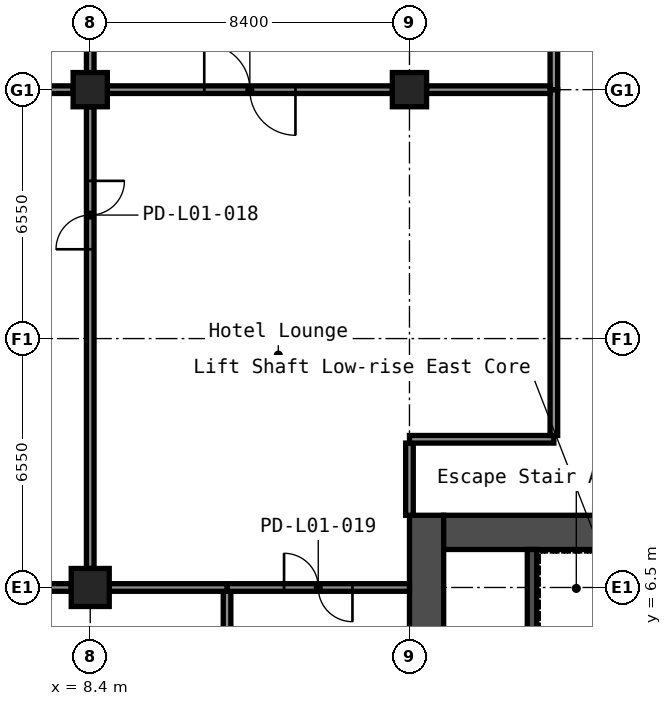
"""IFC4 building model, lengths in metres.
Left out: names, types, materials, properties, quantities, classifications, styles, units other than length and angle.
Written with IfcOpenShell. Run it as: python <this file> out.ifc"""

import sys

from ifc_helpers import new_model, si_unit, direction, frame, frame_2d, origin, origin_2d, place, context, subcontext, project, spatial, rectangle, hollow_rectangle, extrude, element, fill, save


model = new_model("IFC4")
c1 = context("Model", 3, precision=1e-05, world=origin(), true_north=direction((0.0, 1.0)))
c2 = subcontext(c1, "Body", "Model", "MODEL_VIEW")
j1 = project(units=[si_unit("LENGTHUNIT", "METRE"), si_unit("PLANEANGLEUNIT", "RADIAN")], contexts=[c1])
p1 = place(None, origin())
s1 = spatial("IfcSite", under=j1, at=p1, CompositionType="ELEMENT")
p2 = place(p1, origin())
s2 = spatial("IfcBuilding", under=s1, at=p2, CompositionType="ELEMENT")
p3 = place(p2, origin())
s3 = spatial("IfcBuildingStorey", under=s2, at=p3, CompositionType="ELEMENT", Elevation=0.0)
p4 = place(p3, frame((8.4, 6.5, -0.3), z_axis=(0.0, 0.0, 1.0), x_axis=(1.0, 0.0, 0.0)))
e1 = element("IfcColumn", 1, at=p4, inside=s3, PredefinedType="COLUMN", context=c2, shape_type="SweptSolid", body=[
    extrude(hollow_rectangle(XDim=1.0, YDim=1.0, WallThickness=0.04, at=origin_2d()), origin(), (0.0, 0.0, 1.0), 8.9),
])
for number, where, z_axis, x_axis in (
    (2, (8.4, 19.6, -0.3), (0.0, 0.0, 1.0), (1.0, 0.0, 0.0)),
    (3, (16.8, 19.6, -0.3), (0.0, 0.0, 1.0), (1.0, 0.0, 0.0)),
):
    element("IfcColumn", number, at=place(p3, frame(where, z_axis=z_axis, x_axis=x_axis)), inside=s3, PredefinedType="COLUMN", context=c2, shape_type="SweptSolid", body=[
        extrude(hollow_rectangle(XDim=0.9, YDim=0.9, WallThickness=0.036, at=origin_2d()), origin(), (0.0, 0.0, 1.0), 8.9),
    ])
p5 = place(p3, frame((17.25, -8.4, 0.0), z_axis=(0.0, 0.0, 1.0), x_axis=(0.0, 1.0, 0.0)))
e4 = element("IfcWall", 4, at=p5, inside=s3, PredefinedType="SHEAR", context=c2, shape_type="SweptSolid", body=[
    extrude(rectangle(XDim=16.8, YDim=0.9, at=frame_2d((8.4, 0.0))), origin(), (0.0, 0.0, 1.0), 8.6),
])
p6 = place(p5, frame((3.4, 0.0, 0.0)))
e5 = element("IfcOpeningElement", 5, at=p6, cuts=e4, PredefinedType="OPENING", context=c2, shape_type="SweptSolid", body=[
    extrude(rectangle(XDim=1.6, YDim=2.1, at=frame_2d((0.8, 1.05))), frame((0.0, 0.46, 0.0), z_axis=(0.0, -1.0, 0.0), x_axis=(1.0, 0.0, 0.0)), (0.0, 0.0, 1.0), 0.92),
])
p7 = place(p5, frame((9.6, 0.0, 0.0)))
e6 = element("IfcOpeningElement", 6, at=p7, cuts=e4, PredefinedType="OPENING", context=c2, shape_type="SweptSolid", body=[
    extrude(rectangle(XDim=1.6, YDim=2.1, at=frame_2d((0.8, 1.05))), frame((0.0, 0.46, 0.0), z_axis=(0.0, -1.0, 0.0), x_axis=(1.0, 0.0, 0.0)), (0.0, 0.0, 1.0), 0.92),
])
p8 = place(p5, frame((11.8, 0.0, 0.0)))
e7 = element("IfcOpeningElement", 7, at=p8, cuts=e4, PredefinedType="OPENING", context=c2, shape_type="SweptSolid", body=[
    extrude(rectangle(XDim=1.6, YDim=2.1, at=frame_2d((0.8, 1.05))), frame((0.0, 0.46, 0.0), z_axis=(0.0, -1.0, 0.0), x_axis=(1.0, 0.0, 0.0)), (0.0, 0.0, 1.0), 0.92),
])
p9 = place(p3, frame((17.7, 7.95, 0.0), z_axis=(0.0, 0.0, 1.0), x_axis=(1.0, 0.0, 0.0)))
e8 = element("IfcWall", 8, at=p9, inside=s3, PredefinedType="SHEAR", context=c2, shape_type="SweptSolid", body=[
    extrude(rectangle(XDim=15.0, YDim=0.9, at=frame_2d((7.5, 0.0))), origin(), (0.0, 0.0, 1.0), 8.6),
])
p10 = place(p9, frame((10.4, 0.0, 0.0)))
e9 = element("IfcOpeningElement", 9, at=p10, cuts=e8, PredefinedType="OPENING", context=c2, shape_type="SweptSolid", body=[
    extrude(rectangle(XDim=1.2, YDim=2.1, at=frame_2d((0.6, 1.05))), frame((0.0, 0.46, 0.0), z_axis=(0.0, -1.0, 0.0), x_axis=(1.0, 0.0, 0.0)), (0.0, 0.0, 1.0), 0.92),
])
p11 = place(p9, frame((13.35, 0.0, 0.0)))
e10 = element("IfcOpeningElement", 10, at=p11, cuts=e8, PredefinedType="OPENING", context=c2, shape_type="SweptSolid", body=[
    extrude(rectangle(XDim=0.9, YDim=2.1, at=frame_2d((0.45, 1.05))), frame((0.0, 0.46, 0.0), z_axis=(0.0, -1.0, 0.0), x_axis=(1.0, 0.0, 0.0)), (0.0, 0.0, 1.0), 0.92),
])
p12 = place(p9, frame((6.75, 0.0, 0.0)))
e11 = element("IfcOpeningElement", 11, at=p12, cuts=e8, PredefinedType="OPENING", context=c2, shape_type="SweptSolid", body=[
    extrude(rectangle(XDim=1.2, YDim=2.1, at=frame_2d((0.6, 1.05))), frame((0.0, 0.46, 0.0), z_axis=(0.0, -1.0, 0.0), x_axis=(1.0, 0.0, 0.0)), (0.0, 0.0, 1.0), 0.92),
])
p13 = place(p3, frame((20.025, 1.2, 0.0), z_axis=(0.0, 0.0, 1.0), x_axis=(0.0, 1.0, 0.0)))
e12 = element("IfcWall", 12, at=p13, inside=s3, PredefinedType="SHEAR", context=c2, shape_type="SweptSolid", body=[
    extrude(rectangle(XDim=6.3, YDim=0.25, at=frame_2d((3.15, 0.0))), origin(), (0.0, 0.0, 1.0), 8.6),
])
p14 = place(p3, frame((8.4, 24.15, 0.0), z_axis=(0.0, 0.0, 1.0), x_axis=(0.0, -1.0, 0.0)))
e13 = element("IfcWall", 13, at=p14, inside=s3, PredefinedType="PARTITIONING", context=c2, shape_type="SweptSolid", body=[
    extrude(rectangle(XDim=4.1, YDim=0.2, at=frame_2d((2.05, 0.0))), origin(), (0.0, 0.0, 1.0), 8.6),
])
p15 = place(p3, frame((16.8, 8.4, 0.0), z_axis=(0.0, 0.0, 1.0), x_axis=(0.0, 1.0, 0.0)))
e14 = element("IfcWall", 14, at=p15, inside=s3, PredefinedType="PARTITIONING", context=c2, shape_type="SweptSolid", body=[
    extrude(rectangle(XDim=1.9, YDim=0.2, at=frame_2d((0.95, 0.0))), origin(), (0.0, 0.0, 1.0), 8.6),
])
p16 = place(p3, frame((16.8, 10.4, 0.0), z_axis=(0.0, 0.0, 1.0), x_axis=(1.0, 0.0, 0.0)))
e15 = element("IfcWall", 15, at=p16, inside=s3, PredefinedType="PARTITIONING", context=c2, shape_type="SweptSolid", body=[
    extrude(rectangle(XDim=3.8, YDim=0.2, at=frame_2d((1.9, 0.0))), origin(), (0.0, 0.0, 1.0), 8.6),
])
p17 = place(p3, frame((20.6, 10.5, 0.0), z_axis=(0.0, 0.0, 1.0), x_axis=(0.0, 1.0, 0.0)))
e16 = element("IfcWall", 16, at=p17, inside=s3, PredefinedType="PARTITIONING", context=c2, shape_type="SweptSolid", body=[
    extrude(rectangle(XDim=9.1, YDim=0.2, at=frame_2d((4.55, 0.0))), origin(), (0.0, 0.0, 1.0), 8.6),
])
p18 = place(p3, frame((20.6, 19.6, 0.0), z_axis=(0.0, 0.0, 1.0), x_axis=(0.0, 1.0, 0.0)))
e17 = element("IfcWall", 17, at=p18, inside=s3, PredefinedType="PARTITIONING", context=c2, shape_type="SweptSolid", body=[
    extrude(rectangle(XDim=5.25, YDim=0.2, at=frame_2d((2.625, 0.0))), origin(), (0.0, 0.0, 1.0), 8.6),
])
p19 = place(p18, frame((1.8, 0.0, 0.0)))
e18 = element("IfcOpeningElement", 18, at=p19, cuts=e17, PredefinedType="OPENING", context=c2, shape_type="SweptSolid", body=[
    extrude(rectangle(XDim=1.2, YDim=2.1, at=frame_2d((0.6, 1.05))), frame((0.0, 0.11, 0.0), z_axis=(0.0, -1.0, 0.0), x_axis=(1.0, 0.0, 0.0)), (0.0, 0.0, 1.0), 0.22),
])
p20 = place(p3, frame((12.0, -6.4, 0.0), z_axis=(0.0, 0.0, 1.0), x_axis=(0.0, 1.0, 0.0)))
e19 = element("IfcWall", 19, at=p20, inside=s3, PredefinedType="PARTITIONING", context=c2, shape_type="SweptSolid", body=[
    extrude(rectangle(XDim=12.8, YDim=0.2, at=frame_2d((6.4, 0.0))), origin(), (0.0, 0.0, 1.0), 8.6),
])
p21 = place(p20, frame((5.2, 0.0, 0.0)))
e20 = element("IfcOpeningElement", 20, at=p21, cuts=e19, PredefinedType="OPENING", context=c2, shape_type="SweptSolid", body=[
    extrude(rectangle(XDim=2.4, YDim=2.1, at=frame_2d((1.2, 1.05))), frame((0.0, 0.11, 0.0), z_axis=(0.0, -1.0, 0.0), x_axis=(1.0, 0.0, 0.0)), (0.0, 0.0, 1.0), 0.22),
])
p22 = place(p3, frame((12.0, 6.5, 0.0), z_axis=(0.0, 0.0, 1.0), x_axis=(1.0, 0.0, 0.0)))
e21 = element("IfcWall", 21, at=p22, inside=s3, PredefinedType="PARTITIONING", context=c2, shape_type="SweptSolid", body=[
    extrude(rectangle(XDim=4.8, YDim=0.2, at=frame_2d((2.4, 0.0))), origin(), (0.0, 0.0, 1.0), 8.6),
])
p23 = place(p22, frame((1.5, 0.0, 0.0)))
e22 = element("IfcOpeningElement", 22, at=p23, cuts=e21, PredefinedType="OPENING", context=c2, shape_type="SweptSolid", body=[
    extrude(rectangle(XDim=1.8, YDim=2.1, at=frame_2d((0.9, 1.05))), frame((0.0, 0.11, 0.0), z_axis=(0.0, -1.0, 0.0), x_axis=(1.0, 0.0, 0.0)), (0.0, 0.0, 1.0), 0.22),
])
p24 = place(p3, frame((8.9, 6.5, 0.0), z_axis=(0.0, 0.0, 1.0), x_axis=(1.0, 0.0, 0.0)))
e23 = element("IfcWall", 23, at=p24, inside=s3, PredefinedType="PARTITIONING", context=c2, shape_type="SweptSolid", body=[
    extrude(rectangle(XDim=3.1, YDim=0.2, at=frame_2d((1.55, 0.0))), origin(), (0.0, 0.0, 1.0), 8.6),
])
p25 = place(p3, frame((0.5, 6.5, 0.0), z_axis=(0.0, 0.0, 1.0), x_axis=(1.0, 0.0, 0.0)))
e24 = element("IfcWall", 24, at=p25, inside=s3, PredefinedType="PARTITIONING", context=c2, shape_type="SweptSolid", body=[
    extrude(rectangle(XDim=7.4, YDim=0.2, at=frame_2d((3.7, 0.0))), origin(), (0.0, 0.0, 1.0), 8.6),
])
p26 = place(p25, frame((2.5, 0.0, 0.0)))
e25 = element("IfcOpeningElement", 25, at=p26, cuts=e24, PredefinedType="OPENING", context=c2, shape_type="SweptSolid", body=[
    extrude(rectangle(XDim=2.4, YDim=2.1, at=frame_2d((1.2, 1.05))), frame((0.0, 0.11, 0.0), z_axis=(0.0, -1.0, 0.0), x_axis=(1.0, 0.0, 0.0)), (0.0, 0.0, 1.0), 0.22),
])
p27 = place(p3, frame((8.85, 19.6, 0.0), z_axis=(0.0, 0.0, 1.0), x_axis=(1.0, 0.0, 0.0)))
e26 = element("IfcWall", 26, at=p27, inside=s3, PredefinedType="PARTITIONING", context=c2, shape_type="SweptSolid", body=[
    extrude(rectangle(XDim=7.5, YDim=0.2, at=frame_2d((3.75, 0.0))), origin(), (0.0, 0.0, 1.0), 8.6),
])
p28 = place(p27, frame((2.55, 0.0, 0.0)))
e27 = element("IfcOpeningElement", 27, at=p28, cuts=e26, PredefinedType="OPENING", context=c2, shape_type="SweptSolid", body=[
    extrude(rectangle(XDim=2.4, YDim=2.1, at=frame_2d((1.2, 1.05))), frame((0.0, 0.11, 0.0), z_axis=(0.0, -1.0, 0.0), x_axis=(1.0, 0.0, 0.0)), (0.0, 0.0, 1.0), 0.22),
])
p29 = place(p3, frame((17.25, 19.6, 0.0), z_axis=(0.0, 0.0, 1.0), x_axis=(1.0, 0.0, 0.0)))
e28 = element("IfcWall", 28, at=p29, inside=s3, PredefinedType="PARTITIONING", context=c2, shape_type="SweptSolid", body=[
    extrude(rectangle(XDim=3.25, YDim=0.2, at=frame_2d((1.625, 0.0))), origin(), (0.0, 0.0, 1.0), 8.6),
])
p30 = place(p3, frame((0.45, 19.6, 0.0), z_axis=(0.0, 0.0, 1.0), x_axis=(1.0, 0.0, 0.0)))
e29 = element("IfcWall", 29, at=p30, inside=s3, PredefinedType="PARTITIONING", context=c2, shape_type="SweptSolid", body=[
    extrude(rectangle(XDim=7.5, YDim=0.2, at=frame_2d((3.75, 0.0))), origin(), (0.0, 0.0, 1.0), 8.6),
])
p31 = place(p30, frame((2.55, 0.0, 0.0)))
e30 = element("IfcOpeningElement", 30, at=p31, cuts=e29, PredefinedType="OPENING", context=c2, shape_type="SweptSolid", body=[
    extrude(rectangle(XDim=2.4, YDim=2.1, at=frame_2d((1.2, 1.05))), frame((0.0, 0.11, 0.0), z_axis=(0.0, -1.0, 0.0), x_axis=(1.0, 0.0, 0.0)), (0.0, 0.0, 1.0), 0.22),
])
p32 = place(p3, frame((8.4, 19.15, 0.0), z_axis=(0.0, 0.0, 1.0), x_axis=(0.0, -1.0, 0.0)))
e31 = element("IfcWall", 31, at=p32, inside=s3, PredefinedType="PARTITIONING", context=c2, shape_type="SweptSolid", body=[
    extrude(rectangle(XDim=12.15, YDim=0.2, at=frame_2d((6.075, 0.0))), origin(), (0.0, 0.0, 1.0), 8.6),
])
p33 = place(p32, frame((1.95, 0.0, 0.0)))
e32 = element("IfcOpeningElement", 32, at=p33, cuts=e31, PredefinedType="OPENING", context=c2, shape_type="SweptSolid", body=[
    extrude(rectangle(XDim=1.8, YDim=2.1, at=frame_2d((0.9, 1.05))), frame((0.0, 0.11, 0.0), z_axis=(0.0, -1.0, 0.0), x_axis=(1.0, 0.0, 0.0)), (0.0, 0.0, 1.0), 0.22),
])
p34 = place(p28, origin())
e33 = element("IfcDoor", 33, at=p34, inside=s3, OperationType="DOUBLE_DOOR_DOUBLE_SWING", PredefinedType="DOOR", context=c2, shape_type="SweptSolid", body=[
    extrude(rectangle(XDim=2.4, YDim=2.1, at=frame_2d((1.2, 1.05))), frame((0.0, 0.025, 0.0), z_axis=(0.0, -1.0, 0.0), x_axis=(1.0, 0.0, 0.0)), (0.0, 0.0, 1.0), 0.05),
])
fill(e27, e33)
p35 = place(p33, origin())
e34 = element("IfcDoor", 34, at=p35, inside=s3, OperationType="DOUBLE_DOOR_DOUBLE_SWING", PredefinedType="DOOR", context=c2, shape_type="SweptSolid", body=[
    extrude(rectangle(XDim=1.8, YDim=2.1, at=frame_2d((0.9, 1.05))), frame((0.0, 0.025, 0.0), z_axis=(0.0, -1.0, 0.0), x_axis=(1.0, 0.0, 0.0)), (0.0, 0.0, 1.0), 0.05),
])
fill(e32, e34)
p36 = place(p23, origin())
e35 = element("IfcDoor", 35, at=p36, inside=s3, OperationType="DOUBLE_DOOR_DOUBLE_SWING", PredefinedType="DOOR", context=c2, shape_type="SweptSolid", body=[
    extrude(rectangle(XDim=1.8, YDim=2.1, at=frame_2d((0.9, 1.05))), frame((0.0, 0.025, 0.0), z_axis=(0.0, -1.0, 0.0), x_axis=(1.0, 0.0, 0.0)), (0.0, 0.0, 1.0), 0.05),
])
fill(e22, e35)
save(model, sys.argv[1])
